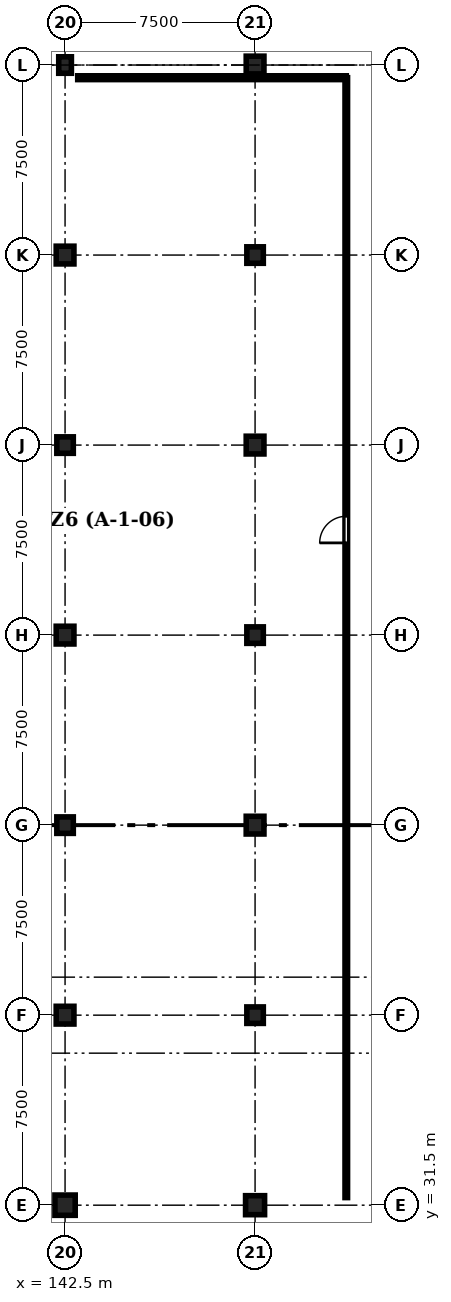
"""IFC4 building model, lengths in metres.
Left out: names, types, materials, properties, quantities, classifications, styles, units other than length and angle.
Written with IfcOpenShell. Run it as: python <this file> out.ifc"""

import sys

from ifc_helpers import new_model, si_unit, direction, frame, frame_2d, origin, origin_2d, place, context, subcontext, project, spatial, rectangle, circle, extrude, element, fill, save


model = new_model("IFC4")
c1 = context("Model", 3, precision=1e-05, world=origin(), true_north=direction((0.0, 1.0)))
c2 = subcontext(c1, "Body", "Model", "MODEL_VIEW")
j1 = project(units=[si_unit("LENGTHUNIT", "METRE"), si_unit("PLANEANGLEUNIT", "RADIAN")], contexts=[c1])
p1 = place(None, origin())
s1 = spatial("IfcSite", under=j1, at=p1, CompositionType="ELEMENT")
p2 = place(p1, origin())
s2 = spatial("IfcBuilding", under=s1, at=p2, CompositionType="ELEMENT")
p3 = place(p2, frame((0.0, 0.0, -4.5)))
s3 = spatial("IfcBuildingStorey", under=s2, at=p3, CompositionType="ELEMENT", Elevation=-4.5)
p4 = place(p3, frame((142.5, 31.5, 0.0), z_axis=(0.0, 0.0, 1.0), x_axis=(1.0, 0.0, 0.0)))
e1 = element("IfcColumn", 1, at=p4, inside=s3, PredefinedType="COLUMN", context=c2, shape_type="SweptSolid", body=[
    extrude(rectangle(XDim=0.8, YDim=0.8, at=origin_2d()), origin(), (0.0, 0.0, 1.0), 4.5),
])
p5 = place(p3, frame((142.5, 39.0, 0.0), z_axis=(0.0, 0.0, 1.0), x_axis=(1.0, 0.0, 0.0)))
e2 = element("IfcColumn", 2, at=p5, inside=s3, PredefinedType="COLUMN", context=c2, shape_type="SweptSolid", body=[
    extrude(rectangle(XDim=0.7, YDim=0.7, at=origin_2d()), origin(), (0.0, 0.0, 1.0), 4.5),
])
p6 = place(p3, frame((142.5, 46.5, 0.0), z_axis=(0.0, 0.0, 1.0), x_axis=(1.0, 0.0, 0.0)))
e3 = element("IfcColumn", 3, at=p6, inside=s3, PredefinedType="COLUMN", context=c2, shape_type="SweptSolid", body=[
    extrude(rectangle(XDim=0.65, YDim=0.65, at=origin_2d()), origin(), (0.0, 0.0, 1.0), 4.5),
])
p7 = place(p3, frame((142.5, 54.0, 0.0), z_axis=(0.0, 0.0, 1.0), x_axis=(1.0, 0.0, 0.0)))
e4 = element("IfcColumn", 4, at=p7, inside=s3, PredefinedType="COLUMN", context=c2, shape_type="SweptSolid", body=[
    extrude(rectangle(XDim=0.7, YDim=0.7, at=origin_2d()), origin(), (0.0, 0.0, 1.0), 4.5),
])
p8 = place(p3, frame((142.5, 61.5, 0.0), z_axis=(0.0, 0.0, 1.0), x_axis=(1.0, 0.0, 0.0)))
e5 = element("IfcColumn", 5, at=p8, inside=s3, PredefinedType="COLUMN", context=c2, shape_type="SweptSolid", body=[
    extrude(rectangle(XDim=0.65, YDim=0.65, at=origin_2d()), origin(), (0.0, 0.0, 1.0), 4.5),
])
p9 = place(p3, frame((142.5, 69.0, 0.0), z_axis=(0.0, 0.0, 1.0), x_axis=(1.0, 0.0, 0.0)))
e6 = element("IfcColumn", 6, at=p9, inside=s3, PredefinedType="COLUMN", context=c2, shape_type="SweptSolid", body=[
    extrude(rectangle(XDim=0.7, YDim=0.7, at=origin_2d()), origin(), (0.0, 0.0, 1.0), 4.5),
])
p10 = place(p3, frame((142.5, 76.5, 0.0), z_axis=(0.0, 0.0, 1.0), x_axis=(1.0, 0.0, 0.0)))
e7 = element("IfcColumn", 7, at=p10, inside=s3, PredefinedType="COLUMN", context=c2, shape_type="SweptSolid", body=[
    extrude(rectangle(XDim=0.5, YDim=0.65, at=origin_2d()), origin(), (0.0, 0.0, 1.0), 4.5),
])
p11 = place(p3, frame((150.0, 31.5, 0.0), z_axis=(0.0, 0.0, 1.0), x_axis=(1.0, 0.0, 0.0)))
e8 = element("IfcColumn", 8, at=p11, inside=s3, PredefinedType="COLUMN", context=c2, shape_type="SweptSolid", body=[
    extrude(circle(Radius=0.375, at=origin_2d()), origin(), (0.0, 0.0, 1.0), 4.5),
])
p12 = place(p3, frame((150.0, 39.0, 0.0), z_axis=(0.0, 0.0, 1.0), x_axis=(1.0, 0.0, 0.0)))
e9 = element("IfcColumn", 9, at=p12, inside=s3, PredefinedType="COLUMN", context=c2, shape_type="SweptSolid", body=[
    extrude(rectangle(XDim=0.65, YDim=0.65, at=origin_2d()), origin(), (0.0, 0.0, 1.0), 4.5),
])
p13 = place(p3, frame((150.0, 46.5, 0.0), z_axis=(0.0, 0.0, 1.0), x_axis=(1.0, 0.0, 0.0)))
e10 = element("IfcColumn", 10, at=p13, inside=s3, PredefinedType="COLUMN", context=c2, shape_type="SweptSolid", body=[
    extrude(rectangle(XDim=0.7, YDim=0.7, at=origin_2d()), origin(), (0.0, 0.0, 1.0), 4.5),
])
p14 = place(p3, frame((150.0, 54.0, 0.0), z_axis=(0.0, 0.0, 1.0), x_axis=(1.0, 0.0, 0.0)))
e11 = element("IfcColumn", 11, at=p14, inside=s3, PredefinedType="COLUMN", context=c2, shape_type="SweptSolid", body=[
    extrude(rectangle(XDim=0.65, YDim=0.65, at=origin_2d()), origin(), (0.0, 0.0, 1.0), 4.5),
])
p15 = place(p3, frame((150.0, 61.5, 0.0), z_axis=(0.0, 0.0, 1.0), x_axis=(1.0, 0.0, 0.0)))
e12 = element("IfcColumn", 12, at=p15, inside=s3, PredefinedType="COLUMN", context=c2, shape_type="SweptSolid", body=[
    extrude(rectangle(XDim=0.7, YDim=0.7, at=origin_2d()), origin(), (0.0, 0.0, 1.0), 4.5),
])
p16 = place(p3, frame((150.0, 69.0, 0.0), z_axis=(0.0, 0.0, 1.0), x_axis=(1.0, 0.0, 0.0)))
e13 = element("IfcColumn", 13, at=p16, inside=s3, PredefinedType="COLUMN", context=c2, shape_type="SweptSolid", body=[
    extrude(rectangle(XDim=0.65, YDim=0.65, at=origin_2d()), origin(), (0.0, 0.0, 1.0), 4.5),
])
p17 = place(p3, frame((150.0, 76.5, 0.0), z_axis=(0.0, 0.0, 1.0), x_axis=(1.0, 0.0, 0.0)))
e14 = element("IfcColumn", 14, at=p17, inside=s3, PredefinedType="COLUMN", context=c2, shape_type="SweptSolid", body=[
    extrude(rectangle(XDim=0.7, YDim=0.7, at=origin_2d()), origin(), (0.0, 0.0, 1.0), 4.5),
])
p18 = place(p3, frame((153.6, 31.8, 0.0), z_axis=(0.0, 0.0, 1.0), x_axis=(0.0, 1.0, 0.0)))
e15 = element("IfcWall", 15, at=p18, inside=s3, PredefinedType="PARTITIONING", context=c2, shape_type="SweptSolid", body=[
    extrude(rectangle(XDim=44.2, YDim=0.1, at=frame_2d((22.1, 0.0))), origin(), (0.0, 0.0, 1.0), 3.725),
])
p19 = place(p18, frame((25.84, 0.0, 0.0)))
e16 = element("IfcOpeningElement", 16, at=p19, cuts=e15, PredefinedType="OPENING", context=c2, shape_type="SweptSolid", body=[
    extrude(rectangle(XDim=1.05, YDim=2.2, at=frame_2d((0.525, 1.1))), frame((0.0, 0.06, 0.0), z_axis=(0.0, -1.0, 0.0), x_axis=(1.0, 0.0, 0.0)), (0.0, 0.0, 1.0), 0.12),
])
p20 = place(p3, frame((143.0, 76.0, 0.0), z_axis=(0.0, 0.0, 1.0), x_axis=(1.0, 0.0, 0.0)))
e17 = element("IfcWall", 17, at=p20, inside=s3, PredefinedType="PARTITIONING", context=c2, shape_type="SweptSolid", body=[
    extrude(rectangle(XDim=10.6, YDim=0.15, at=frame_2d((5.3, 0.0))), origin(), (0.0, 0.0, 1.0), 4.125),
])
p21 = place(p19, origin())
e18 = element("IfcDoor", 18, at=p21, inside=s3, OperationType="SINGLE_SWING_LEFT", PredefinedType="DOOR", context=c2, shape_type="SweptSolid", body=[
    extrude(rectangle(XDim=1.05, YDim=2.2, at=frame_2d((0.525, 1.1))), frame((0.0, 0.025, 0.0), z_axis=(0.0, -1.0, 0.0), x_axis=(1.0, 0.0, 0.0)), (0.0, 0.0, 1.0), 0.05),
])
fill(e16, e18)
save(model, sys.argv[1])
